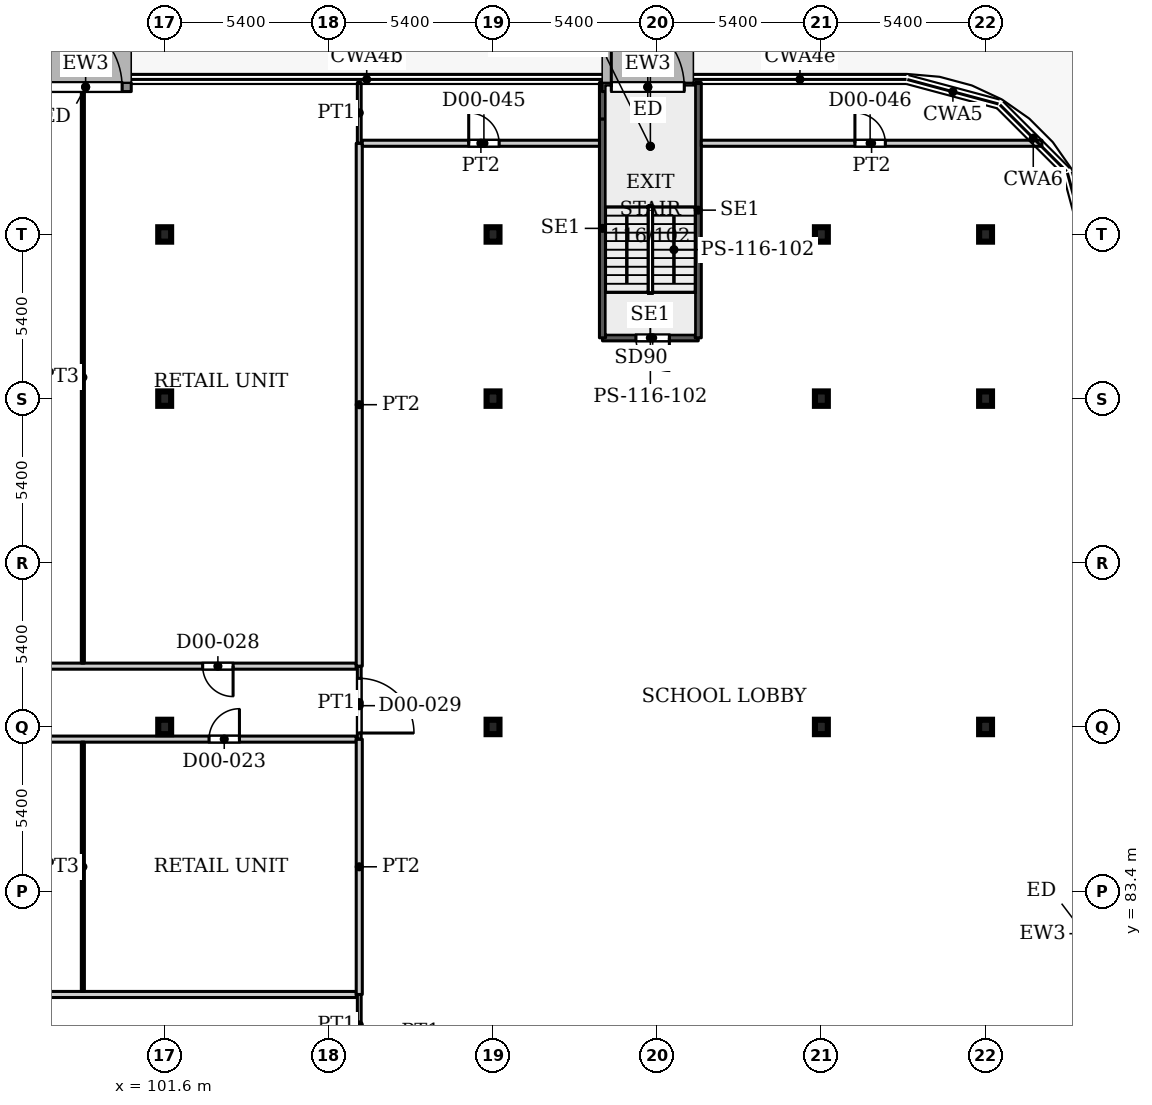
"""IFC4 building model, lengths in metres.
Left out: names, types, materials, properties, quantities, classifications, styles, units other than length and angle.
Written with IfcOpenShell. Run it as: python <this file> out.ifc"""

import sys

from ifc_helpers import new_model, si_unit, direction, frame, frame_2d, origin, origin_2d, place, context, subcontext, project, spatial, rectangle, i_section, extrude, source, transform, mapped, element, fill, save


model = new_model("IFC4")
c1 = context("Model", 3, precision=1e-05, world=origin(), true_north=direction((0.0, 1.0)))
c2 = subcontext(c1, "Body", "Model", "MODEL_VIEW")
j1 = project(units=[si_unit("LENGTHUNIT", "METRE"), si_unit("PLANEANGLEUNIT", "RADIAN")], contexts=[c1])
p1 = place(None, origin())
s1 = spatial("IfcSite", under=j1, at=p1, CompositionType="ELEMENT")
p2 = place(p1, origin())
s2 = spatial("IfcBuilding", under=s1, at=p2, CompositionType="ELEMENT")
p3 = place(p2, origin())
s3 = spatial("IfcBuildingStorey", under=s2, at=p3, CompositionType="ELEMENT", Elevation=0.0)
for number, where, z_axis, x_axis in (
    (1, (101.6, 88.8, 0.0), (0.0, 0.0, 1.0), (1.0, 0.0, 0.0)),
    (2, (112.4, 88.8, 0.0), (0.0, 0.0, 1.0), (1.0, 0.0, 0.0)),
    (3, (123.2, 88.8, 0.0), (0.0, 0.0, 1.0), (1.0, 0.0, 0.0)),
    (4, (128.6, 88.8, 0.0), (0.0, 0.0, 1.0), (1.0, 0.0, 0.0)),
    (5, (101.6, 99.6, 0.0), (0.0, 0.0, 1.0), (1.0, 0.0, 0.0)),
    (6, (112.4, 99.6, 0.0), (0.0, 0.0, 1.0), (1.0, 0.0, 0.0)),
    (7, (123.2, 99.6, 0.0), (0.0, 0.0, 1.0), (1.0, 0.0, 0.0)),
    (8, (128.6, 99.6, 0.0), (0.0, 0.0, 1.0), (1.0, 0.0, 0.0)),
    (9, (101.6, 105.0, 0.0), (0.0, 0.0, 1.0), (1.0, 0.0, 0.0)),
    (10, (112.4, 105.0, 0.0), (0.0, 0.0, 1.0), (1.0, 0.0, 0.0)),
    (11, (123.2, 105.0, 0.0), (0.0, 0.0, 1.0), (1.0, 0.0, 0.0)),
    (12, (128.6, 105.0, 0.0), (0.0, 0.0, 1.0), (1.0, 0.0, 0.0)),
):
    element("IfcColumn", number, at=place(p3, frame(where, z_axis=z_axis, x_axis=x_axis)), inside=s3, PredefinedType="COLUMN", context=c2, shape_type="SweptSolid", body=[
        extrude(i_section(OverallWidth=0.424, OverallDepth=0.474, WebThickness=0.048, FlangeThickness=0.077, FilletRadius=0.014, at=origin_2d()), origin(), (0.0, 0.0, 1.0), 7.5),
    ])
p4 = place(p3, frame((97.5, 109.85, 0.0), z_axis=(0.0, 0.0, 1.0), x_axis=(1.0, 0.0, 0.0)))
e13 = element("IfcWall", 13, at=p4, inside=s3, PredefinedType="SOLIDWALL", context=c2, shape_type="SweptSolid", body=[
    extrude(rectangle(XDim=3.0, YDim=0.3, at=frame_2d((1.5, 0.0))), origin(), (0.0, 0.0, 1.0), 7.25),
])
p5 = place(p4, frame((0.3, 0.0, 0.0)))
e14 = element("IfcOpeningElement", 14, at=p5, cuts=e13, PredefinedType="OPENING", context=c2, shape_type="SweptSolid", body=[
    extrude(rectangle(XDim=2.4, YDim=2.7, at=frame_2d((1.2, 1.35))), frame((0.0, 0.16, 0.0), z_axis=(0.0, -1.0, 0.0), x_axis=(1.0, 0.0, 0.0)), (0.0, 0.0, 1.0), 0.32),
])
p6 = place(p3, frame((115.99, 109.85, 0.0), z_axis=(0.0, 0.0, 1.0), x_axis=(1.0, 0.0, 0.0)))
e15 = element("IfcWall", 15, at=p6, inside=s3, PredefinedType="SOLIDWALL", context=c2, shape_type="SweptSolid", body=[
    extrude(rectangle(XDim=3.0, YDim=0.3, at=frame_2d((1.5, 0.0))), origin(), (0.0, 0.0, 1.0), 7.25),
])
p7 = place(p6, frame((0.3, 0.0, 0.0)))
e16 = element("IfcOpeningElement", 16, at=p7, cuts=e15, PredefinedType="OPENING", context=c2, shape_type="SweptSolid", body=[
    extrude(rectangle(XDim=2.4, YDim=2.7, at=frame_2d((1.2, 1.35))), frame((0.0, 0.16, 0.0), z_axis=(0.0, -1.0, 0.0), x_axis=(1.0, 0.0, 0.0)), (0.0, 0.0, 1.0), 0.32),
])
p8 = place(p3, frame((116.0, 101.6, 0.0), z_axis=(0.0, 0.0, 1.0), x_axis=(1.0, 0.0, 0.0)))
e17 = element("IfcWall", 17, at=p8, inside=s3, PredefinedType="SHEAR", context=c2, shape_type="SweptSolid", body=[
    extrude(rectangle(XDim=3.15, YDim=0.2, at=frame_2d((1.575, 0.0))), origin(), (0.0, 0.0, 1.0), 7.5),
])
p9 = place(p8, frame((1.1, 0.0, 0.0)))
e18 = element("IfcOpeningElement", 18, at=p9, cuts=e17, PredefinedType="OPENING", context=c2, shape_type="SweptSolid", body=[
    extrude(rectangle(XDim=1.1, YDim=2.2, at=frame_2d((0.55, 1.1))), frame((0.0, 0.11, 0.0), z_axis=(0.0, -1.0, 0.0), x_axis=(1.0, 0.0, 0.0)), (0.0, 0.0, 1.0), 0.22),
])
p10 = place(p3, frame((116.0, 101.6, 0.0), z_axis=(0.0, 0.0, 1.0), x_axis=(0.0, 1.0, 0.0)))
e19 = element("IfcWall", 19, at=p10, inside=s3, PredefinedType="SHEAR", context=c2, shape_type="SweptSolid", body=[
    extrude(rectangle(XDim=7.2, YDim=0.2, at=frame_2d((3.6, 0.0))), origin(), (0.0, 0.0, 1.0), 7.5),
])
p11 = place(p3, frame((116.0, 108.8, 0.0), z_axis=(0.0, 0.0, 1.0), x_axis=(0.0, 1.0, 0.0)))
e20 = element("IfcWall", 20, at=p11, inside=s3, PredefinedType="SHEAR", context=c2, shape_type="SweptSolid", body=[
    extrude(rectangle(XDim=1.2, YDim=0.2, at=frame_2d((0.6, 0.0))), origin(), (0.0, 0.0, 1.0), 7.5),
])
p12 = place(p3, frame((119.15, 101.6, 0.0), z_axis=(0.0, 0.0, 1.0), x_axis=(0.0, 1.0, 0.0)))
e21 = element("IfcWall", 21, at=p12, inside=s3, PredefinedType="SHEAR", context=c2, shape_type="SweptSolid", body=[
    extrude(rectangle(XDim=8.4, YDim=0.2, at=frame_2d((4.2, 0.0))), origin(), (0.0, 0.0, 1.0), 7.5),
])
p13 = place(p3, frame((58.1, 80.0, 0.0), z_axis=(0.0, 0.0, 1.0), x_axis=(1.0, 0.0, 0.0)))
e22 = element("IfcWall", 22, at=p13, inside=s3, PredefinedType="PARTITIONING", context=c2, shape_type="SweptSolid", body=[
    extrude(rectangle(XDim=49.8, YDim=0.2, at=frame_2d((24.9, 0.0))), origin(), (0.0, 0.0, 1.0), 7.08),
])
p14 = place(p3, frame((58.1, 88.4, 0.0), z_axis=(0.0, 0.0, 1.0), x_axis=(1.0, 0.0, 0.0)))
e23 = element("IfcWall", 23, at=p14, inside=s3, PredefinedType="PARTITIONING", context=c2, shape_type="SweptSolid", body=[
    extrude(rectangle(XDim=49.8, YDim=0.2, at=frame_2d((24.9, 0.0))), origin(), (0.0, 0.0, 1.0), 7.08),
])
p15 = place(p14, frame((5.05, 0.0, 0.0)))
e24 = element("IfcOpeningElement", 24, at=p15, cuts=e23, PredefinedType="OPENING", context=c2, shape_type="SweptSolid", body=[
    extrude(rectangle(XDim=1.0, YDim=2.1, at=frame_2d((0.5, 1.05))), frame((0.0, 0.11, 0.0), z_axis=(0.0, -1.0, 0.0), x_axis=(1.0, 0.0, 0.0)), (0.0, 0.0, 1.0), 0.22),
])
p16 = place(p14, frame((15.414, 0.0, 0.0)))
e25 = element("IfcOpeningElement", 25, at=p16, cuts=e23, PredefinedType="OPENING", context=c2, shape_type="SweptSolid", body=[
    extrude(rectangle(XDim=1.0, YDim=2.1, at=frame_2d((0.5, 1.05))), frame((0.0, 0.11, 0.0), z_axis=(0.0, -1.0, 0.0), x_axis=(1.0, 0.0, 0.0)), (0.0, 0.0, 1.0), 0.22),
])
p17 = place(p14, frame((24.505, 0.0, 0.0)))
e26 = element("IfcOpeningElement", 26, at=p17, cuts=e23, PredefinedType="OPENING", context=c2, shape_type="SweptSolid", body=[
    extrude(rectangle(XDim=1.0, YDim=2.1, at=frame_2d((0.5, 1.05))), frame((0.0, 0.11, 0.0), z_axis=(0.0, -1.0, 0.0), x_axis=(1.0, 0.0, 0.0)), (0.0, 0.0, 1.0), 0.22),
])
p18 = place(p14, frame((34.595, 0.0, 0.0)))
e27 = element("IfcOpeningElement", 27, at=p18, cuts=e23, PredefinedType="OPENING", context=c2, shape_type="SweptSolid", body=[
    extrude(rectangle(XDim=1.0, YDim=2.1, at=frame_2d((0.5, 1.05))), frame((0.0, 0.11, 0.0), z_axis=(0.0, -1.0, 0.0), x_axis=(1.0, 0.0, 0.0)), (0.0, 0.0, 1.0), 0.22),
])
p19 = place(p14, frame((44.959, 0.0, 0.0)))
e28 = element("IfcOpeningElement", 28, at=p19, cuts=e23, PredefinedType="OPENING", context=c2, shape_type="SweptSolid", body=[
    extrude(rectangle(XDim=1.0, YDim=2.1, at=frame_2d((0.5, 1.05))), frame((0.0, 0.11, 0.0), z_axis=(0.0, -1.0, 0.0), x_axis=(1.0, 0.0, 0.0)), (0.0, 0.0, 1.0), 0.22),
])
p20 = place(p3, frame((58.1, 90.8, 0.0), z_axis=(0.0, 0.0, 1.0), x_axis=(1.0, 0.0, 0.0)))
e29 = element("IfcWall", 29, at=p20, inside=s3, PredefinedType="PARTITIONING", context=c2, shape_type="SweptSolid", body=[
    extrude(rectangle(XDim=49.8, YDim=0.2, at=frame_2d((24.9, 0.0))), origin(), (0.0, 0.0, 1.0), 7.08),
])
p21 = place(p20, frame((4.914, 0.0, 0.0)))
e30 = element("IfcOpeningElement", 30, at=p21, cuts=e29, PredefinedType="OPENING", context=c2, shape_type="SweptSolid", body=[
    extrude(rectangle(XDim=1.2, YDim=2.1, at=frame_2d((0.6, 1.05))), frame((0.0, 0.11, 0.0), z_axis=(0.0, -1.0, 0.0), x_axis=(1.0, 0.0, 0.0)), (0.0, 0.0, 1.0), 0.22),
])
p22 = place(p20, frame((15.205, 0.0, 0.0)))
e31 = element("IfcOpeningElement", 31, at=p22, cuts=e29, PredefinedType="OPENING", context=c2, shape_type="SweptSolid", body=[
    extrude(rectangle(XDim=1.0, YDim=2.1, at=frame_2d((0.5, 1.05))), frame((0.0, 0.11, 0.0), z_axis=(0.0, -1.0, 0.0), x_axis=(1.0, 0.0, 0.0)), (0.0, 0.0, 1.0), 0.22),
])
p23 = place(p20, frame((24.295, 0.0, 0.0)))
e32 = element("IfcOpeningElement", 32, at=p23, cuts=e29, PredefinedType="OPENING", context=c2, shape_type="SweptSolid", body=[
    extrude(rectangle(XDim=1.0, YDim=2.1, at=frame_2d((0.5, 1.05))), frame((0.0, 0.11, 0.0), z_axis=(0.0, -1.0, 0.0), x_axis=(1.0, 0.0, 0.0)), (0.0, 0.0, 1.0), 0.22),
])
p24 = place(p20, frame((34.659, 0.0, 0.0)))
e33 = element("IfcOpeningElement", 33, at=p24, cuts=e29, PredefinedType="OPENING", context=c2, shape_type="SweptSolid", body=[
    extrude(rectangle(XDim=1.0, YDim=2.1, at=frame_2d((0.5, 1.05))), frame((0.0, 0.11, 0.0), z_axis=(0.0, -1.0, 0.0), x_axis=(1.0, 0.0, 0.0)), (0.0, 0.0, 1.0), 0.22),
])
p25 = place(p20, frame((44.75, 0.0, 0.0)))
e34 = element("IfcOpeningElement", 34, at=p25, cuts=e29, PredefinedType="OPENING", context=c2, shape_type="SweptSolid", body=[
    extrude(rectangle(XDim=1.0, YDim=2.1, at=frame_2d((0.5, 1.05))), frame((0.0, 0.11, 0.0), z_axis=(0.0, -1.0, 0.0), x_axis=(1.0, 0.0, 0.0)), (0.0, 0.0, 1.0), 0.22),
])
p26 = place(p3, frame((98.909, 80.1, 0.0), z_axis=(0.0, 0.0, 1.0), x_axis=(0.0, 1.0, 0.0)))
e35 = element("IfcWall", 35, at=p26, inside=s3, PredefinedType="PARTITIONING", context=c2, shape_type="SweptSolid", body=[
    extrude(rectangle(XDim=8.2, YDim=0.1, at=frame_2d((4.1, 0.0))), origin(), (0.0, 0.0, 1.0), 7.08),
])
p27 = place(p3, frame((98.909, 90.9, 0.0), z_axis=(0.0, 0.0, 1.0), x_axis=(0.0, 1.0, 0.0)))
e36 = element("IfcWall", 36, at=p27, inside=s3, PredefinedType="PARTITIONING", context=c2, shape_type="SweptSolid", body=[
    extrude(rectangle(XDim=18.801, YDim=0.1, at=frame_2d((9.4, 0.0))), origin(), (0.0, 0.0, 1.0), 7.08),
])
p28 = place(p3, frame((108.0, 78.0, 0.0), z_axis=(0.0, 0.0, 1.0), x_axis=(0.0, 1.0, 0.0)))
e37 = element("IfcWall", 37, at=p28, inside=s3, PredefinedType="PARTITIONING", context=c2, shape_type="SweptSolid", body=[
    extrude(rectangle(XDim=2.0, YDim=0.125, at=frame_2d((1.0, 0.0))), origin(), (0.0, 0.0, 1.0), 7.08),
])
p29 = place(p3, frame((108.0, 80.0, 0.0), z_axis=(0.0, 0.0, 1.0), x_axis=(0.0, 1.0, 0.0)))
e38 = element("IfcWall", 38, at=p29, inside=s3, PredefinedType="PARTITIONING", context=c2, shape_type="SweptSolid", body=[
    extrude(rectangle(XDim=8.4, YDim=0.2, at=frame_2d((4.2, 0.0))), origin(), (0.0, 0.0, 1.0), 7.08),
])
p30 = place(p3, frame((108.0, 88.4, 0.0), z_axis=(0.0, 0.0, 1.0), x_axis=(0.0, 1.0, 0.0)))
e39 = element("IfcWall", 39, at=p30, inside=s3, PredefinedType="PARTITIONING", context=c2, shape_type="SweptSolid", body=[
    extrude(rectangle(XDim=2.4, YDim=0.125, at=frame_2d((1.2, 0.0))), origin(), (0.0, 0.0, 1.0), 7.08),
])
p31 = place(p30, frame((0.2, 0.0, 0.0)))
e40 = element("IfcOpeningElement", 40, at=p31, cuts=e39, PredefinedType="OPENING", context=c2, shape_type="SweptSolid", body=[
    extrude(rectangle(XDim=1.8, YDim=2.1, at=frame_2d((0.9, 1.05))), frame((0.0, 0.073, 0.0), z_axis=(0.0, -1.0, 0.0), x_axis=(1.0, 0.0, 0.0)), (0.0, 0.0, 1.0), 0.145),
])
p32 = place(p3, frame((108.0, 90.8, 0.0), z_axis=(0.0, 0.0, 1.0), x_axis=(0.0, 1.0, 0.0)))
e41 = element("IfcWall", 41, at=p32, inside=s3, PredefinedType="PARTITIONING", context=c2, shape_type="SweptSolid", body=[
    extrude(rectangle(XDim=17.2, YDim=0.2, at=frame_2d((8.6, 0.0))), origin(), (0.0, 0.0, 1.0), 7.08),
])
p33 = place(p3, frame((108.0, 108.0, 0.0), z_axis=(0.0, 0.0, 1.0), x_axis=(0.0, 1.0, 0.0)))
e42 = element("IfcWall", 42, at=p33, inside=s3, PredefinedType="PARTITIONING", context=c2, shape_type="SweptSolid", body=[
    extrude(rectangle(XDim=2.0, YDim=0.125, at=frame_2d((1.0, 0.0))), origin(), (0.0, 0.0, 1.0), 7.08),
])
p34 = place(p3, frame((108.1, 108.0, 0.0), z_axis=(0.0, 0.0, 1.0), x_axis=(1.0, 0.0, 0.0)))
e43 = element("IfcWall", 43, at=p34, inside=s3, PredefinedType="PARTITIONING", context=c2, shape_type="SweptSolid", body=[
    extrude(rectangle(XDim=7.801, YDim=0.2, at=frame_2d((3.9, 0.0))), origin(), (0.0, 0.0, 1.0), 7.08),
])
p35 = place(p34, frame((3.5, 0.0, 0.0)))
e44 = element("IfcOpeningElement", 44, at=p35, cuts=e43, PredefinedType="OPENING", context=c2, shape_type="SweptSolid", body=[
    extrude(rectangle(XDim=1.0, YDim=2.1, at=frame_2d((0.5, 1.05))), frame((0.0, 0.11, 0.0), z_axis=(0.0, -1.0, 0.0), x_axis=(1.0, 0.0, 0.0)), (0.0, 0.0, 1.0), 0.22),
])
p36 = place(p3, frame((119.249, 108.0, 0.0), z_axis=(0.0, 0.0, 1.0), x_axis=(1.0, 0.0, 0.0)))
e45 = element("IfcWall", 45, at=p36, inside=s3, PredefinedType="PARTITIONING", context=c2, shape_type="SweptSolid", body=[
    extrude(rectangle(XDim=11.204, YDim=0.2, at=frame_2d((5.602, 0.0))), origin(), (0.0, 0.0, 1.0), 7.08),
])
p37 = place(p36, frame((5.054, 0.0, 0.0)))
e46 = element("IfcOpeningElement", 46, at=p37, cuts=e45, PredefinedType="OPENING", context=c2, shape_type="SweptSolid", body=[
    extrude(rectangle(XDim=1.0, YDim=2.1, at=frame_2d((0.5, 1.05))), frame((0.0, 0.11, 0.0), z_axis=(0.0, -1.0, 0.0), x_axis=(1.0, 0.0, 0.0)), (0.0, 0.0, 1.0), 0.22),
])
m1 = source(origin(), c2, "Body", "SweptSolid", [
    extrude(rectangle(XDim=2.4, YDim=2.7, at=frame_2d((1.2, 1.35))), frame((0.0, 0.025, 0.0), z_axis=(0.0, -1.0, 0.0), x_axis=(1.0, 0.0, 0.0)), (0.0, 0.0, 1.0), 0.05),
])
p38 = place(p5, origin())
e47 = element("IfcDoor", 47, at=p38, inside=s3, OperationType="DOUBLE_DOOR_SINGLE_SWING", PredefinedType="DOOR", context=c2, shape_type="MappedRepresentation", body=[
    mapped(m1, transform((0.0, 0.0, 0.0), x_axis=(1.0, 0.0, 0.0), y_axis=(0.0, 1.0, 0.0), z_axis=(0.0, 0.0, 1.0), scale=1.0)),
])
fill(e14, e47)
p39 = place(p7, origin())
e48 = element("IfcDoor", 48, at=p39, inside=s3, OperationType="DOUBLE_DOOR_SINGLE_SWING", PredefinedType="DOOR", context=c2, shape_type="MappedRepresentation", body=[
    mapped(m1, transform((0.0, 0.0, 0.0), x_axis=(1.0, 0.0, 0.0), y_axis=(0.0, 1.0, 0.0), z_axis=(0.0, 0.0, 1.0), scale=1.0)),
])
fill(e16, e48)
m2 = source(origin(), c2, "Body", "SweptSolid", [
    extrude(rectangle(XDim=1.1, YDim=2.2, at=frame_2d((0.55, 1.1))), frame((0.0, 0.025, 0.0), z_axis=(0.0, -1.0, 0.0), x_axis=(1.0, 0.0, 0.0)), (0.0, 0.0, 1.0), 0.05),
])
p40 = place(p9, origin())
e49 = element("IfcDoor", 49, at=p40, inside=s3, OperationType="SINGLE_SWING_RIGHT", PredefinedType="DOOR", context=c2, shape_type="MappedRepresentation", body=[
    mapped(m2, transform((0.0, 0.0, 0.0), x_axis=(1.0, 0.0, 0.0), y_axis=(0.0, 1.0, 0.0), z_axis=(0.0, 0.0, 1.0), scale=1.0)),
])
fill(e18, e49)
m3 = source(origin(), c2, "Body", "SweptSolid", [
    extrude(rectangle(XDim=1.0, YDim=2.1, at=frame_2d((0.5, 1.05))), frame((0.0, 0.025, 0.0), z_axis=(0.0, -1.0, 0.0), x_axis=(1.0, 0.0, 0.0)), (0.0, 0.0, 1.0), 0.05),
])
p41 = place(p19, origin())
e50 = element("IfcDoor", 50, at=p41, inside=s3, OperationType="SINGLE_SWING_LEFT", PredefinedType="DOOR", context=c2, shape_type="MappedRepresentation", body=[
    mapped(m3, transform((0.0, 0.0, 0.0), x_axis=(1.0, 0.0, 0.0), y_axis=(0.0, 1.0, 0.0), z_axis=(0.0, 0.0, 1.0), scale=1.0)),
])
fill(e28, e50)
p42 = place(p25, origin())
e51 = element("IfcDoor", 51, at=p42, inside=s3, OperationType="SINGLE_SWING_RIGHT", PredefinedType="DOOR", context=c2, shape_type="MappedRepresentation", body=[
    mapped(m3, transform((0.0, 0.0, 0.0), x_axis=(1.0, 0.0, 0.0), y_axis=(0.0, 1.0, 0.0), z_axis=(0.0, 0.0, 1.0), scale=1.0)),
])
fill(e34, e51)
m4 = source(origin(), c2, "Body", "SweptSolid", [
    extrude(rectangle(XDim=1.8, YDim=2.1, at=frame_2d((0.9, 1.05))), frame((0.0, 0.025, 0.0), z_axis=(0.0, -1.0, 0.0), x_axis=(1.0, 0.0, 0.0)), (0.0, 0.0, 1.0), 0.05),
])
p43 = place(p31, origin())
e52 = element("IfcDoor", 52, at=p43, inside=s3, OperationType="DOUBLE_DOOR_SINGLE_SWING", PredefinedType="DOOR", context=c2, shape_type="MappedRepresentation", body=[
    mapped(m4, transform((0.0, 0.0, 0.0), x_axis=(1.0, 0.0, 0.0), y_axis=(0.0, 1.0, 0.0), z_axis=(0.0, 0.0, 1.0), scale=1.0)),
])
fill(e40, e52)
p44 = place(p35, origin())
e53 = element("IfcDoor", 53, at=p44, inside=s3, OperationType="SINGLE_SWING_LEFT", PredefinedType="DOOR", context=c2, shape_type="MappedRepresentation", body=[
    mapped(m3, transform((0.0, 0.0, 0.0), x_axis=(1.0, 0.0, 0.0), y_axis=(0.0, 1.0, 0.0), z_axis=(0.0, 0.0, 1.0), scale=1.0)),
])
fill(e44, e53)
p45 = place(p37, origin())
e54 = element("IfcDoor", 54, at=p45, inside=s3, OperationType="SINGLE_SWING_LEFT", PredefinedType="DOOR", context=c2, shape_type="MappedRepresentation", body=[
    mapped(m3, transform((0.0, 0.0, 0.0), x_axis=(1.0, 0.0, 0.0), y_axis=(0.0, 1.0, 0.0), z_axis=(0.0, 0.0, 1.0), scale=1.0)),
])
fill(e46, e54)
save(model, sys.argv[1])
